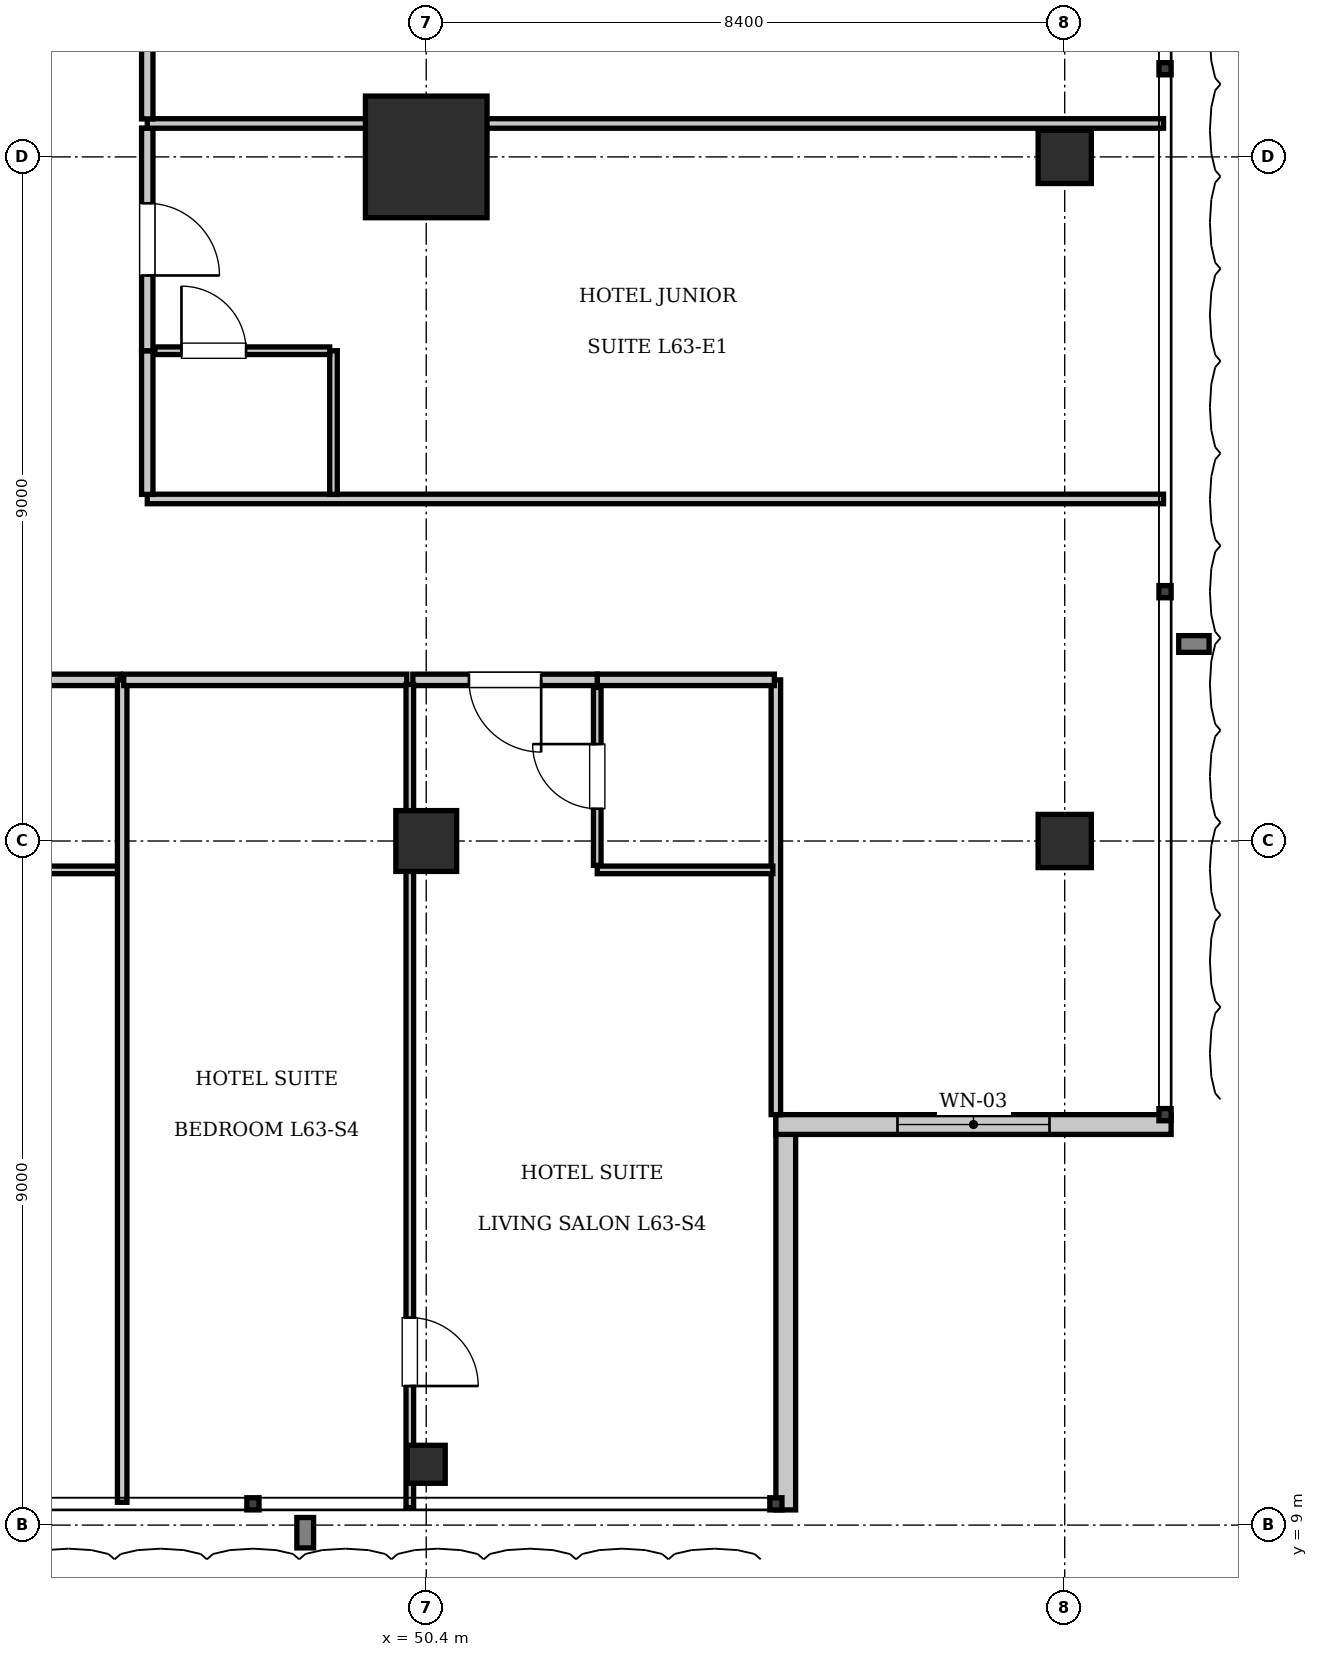
"""IFC4 building model, lengths in metres.
Left out: names, types, materials, properties, quantities, classifications, styles, units other than length and angle.
Written with IfcOpenShell. Run it as: python <this file> out.ifc"""

import sys

from ifc_helpers import new_model, si_unit, direction, frame, frame_2d, origin, origin_2d, place, context, subcontext, project, spatial, rectangle, i_section, extrude, element, fill, save


model = new_model("IFC4")
c1 = context("Model", 3, precision=1e-05, world=origin(), true_north=direction((0.0, 1.0)))
c2 = subcontext(c1, "Body", "Model", "MODEL_VIEW")
j1 = project(units=[si_unit("LENGTHUNIT", "METRE"), si_unit("PLANEANGLEUNIT", "RADIAN")], contexts=[c1])
p1 = place(None, origin())
s1 = spatial("IfcSite", under=j1, at=p1, CompositionType="ELEMENT")
p2 = place(p1, origin())
s2 = spatial("IfcBuilding", under=s1, at=p2, CompositionType="ELEMENT")
p3 = place(p2, frame((0.0, 0.0, 258.65)))
s3 = spatial("IfcBuildingStorey", under=s2, at=p3, CompositionType="ELEMENT", Elevation=258.65)
p4 = place(p3, frame((50.4, 27.0, 0.0), z_axis=(0.0, 0.0, 1.0), x_axis=(1.0, 0.0, 0.0)))
e1 = element("IfcColumn", 1, at=p4, inside=s3, PredefinedType="COLUMN", context=c2, shape_type="SweptSolid", body=[
    extrude(rectangle(XDim=1.6, YDim=1.6, at=origin_2d()), origin(), (0.0, 0.0, 1.0), 3.85),
])
p5 = place(p3, frame((50.4, 18.0, 0.0), z_axis=(0.0, 0.0, 1.0), x_axis=(1.0, 0.0, 0.0)))
e2 = element("IfcColumn", 2, at=p5, inside=s3, PredefinedType="COLUMN", context=c2, shape_type="SweptSolid", body=[
    extrude(rectangle(XDim=0.8, YDim=0.8, at=origin_2d()), origin(), (0.0, 0.0, 1.0), 3.85),
])
for number, where, z_axis, x_axis in (
    (3, (58.8, 18.0, 0.0), (0.0, 0.0, 1.0), (1.0, 0.0, 0.0)),
    (4, (58.8, 27.0, 0.0), (0.0, 0.0, 1.0), (1.0, 0.0, 0.0)),
):
    element("IfcColumn", number, at=place(p3, frame(where, z_axis=z_axis, x_axis=x_axis)), inside=s3, PredefinedType="COLUMN", context=c2, shape_type="SweptSolid", body=[
        extrude(rectangle(XDim=0.7, YDim=0.7, at=origin_2d()), origin(), (0.0, 0.0, 1.0), 3.85),
    ])
p6 = place(p3, frame((50.4, 9.8, 0.0), z_axis=(0.0, 0.0, 1.0), x_axis=(1.0, 0.0, 0.0)))
e5 = element("IfcColumn", 5, at=p6, inside=s3, PredefinedType="COLUMN", context=c2, shape_type="SweptSolid", body=[
    extrude(i_section(OverallWidth=0.5, OverallDepth=0.5, WebThickness=0.022, FlangeThickness=0.032, at=origin_2d()), origin(), (0.0, 0.0, 1.0), 3.85),
])
p7 = place(p3, frame((55.13, 14.4, 0.0), z_axis=(0.0, 0.0, 1.0), x_axis=(0.0, -1.0, 0.0)))
e6 = element("IfcWall", 6, at=p7, inside=s3, PredefinedType="SOLIDWALL", context=c2, shape_type="SweptSolid", body=[
    extrude(rectangle(XDim=5.2, YDim=0.26, at=frame_2d((2.6, 0.0))), origin(), (0.0, 0.0, 1.0), 3.61),
])
p8 = place(p3, frame((60.2, 14.27, 0.0), z_axis=(0.0, 0.0, 1.0), x_axis=(-1.0, 0.0, 0.0)))
e7 = element("IfcWall", 7, at=p8, inside=s3, PredefinedType="SOLIDWALL", context=c2, shape_type="SweptSolid", body=[
    extrude(rectangle(XDim=5.2, YDim=0.26, at=frame_2d((2.6, 0.0))), origin(), (0.0, 0.0, 1.0), 3.61),
])
p9 = place(p8, frame((1.6, 0.0, 0.9)))
e8 = element("IfcOpeningElement", 8, at=p9, cuts=e7, PredefinedType="OPENING", context=c2, shape_type="SweptSolid", body=[
    extrude(rectangle(XDim=2.0, YDim=2.2, at=frame_2d((1.0, 1.1))), frame((0.0, 0.14, 0.0), z_axis=(0.0, -1.0, 0.0), x_axis=(1.0, 0.0, 0.0)), (0.0, 0.0, 1.0), 0.28),
])
p10 = place(p3, frame((55.0, 14.4, 0.0), z_axis=(0.0, 0.0, 1.0), x_axis=(0.0, 1.0, 0.0)))
e9 = element("IfcWall", 9, at=p10, inside=s3, PredefinedType="PARTITIONING", context=c2, shape_type="SweptSolid", body=[
    extrude(rectangle(XDim=5.72, YDim=0.125, at=frame_2d((2.86, 0.0))), origin(), (0.0, 0.0, 1.0), 3.61),
])
p11 = place(p3, frame((44.05, 20.12, 0.0), z_axis=(0.0, 0.0, 1.0), x_axis=(1.0, 0.0, 0.0)))
e10 = element("IfcWall", 10, at=p11, inside=s3, PredefinedType="PARTITIONING", context=c2, shape_type="SweptSolid", body=[
    extrude(rectangle(XDim=2.33, YDim=0.15, at=frame_2d((1.165, 0.0))), origin(), (0.0, 0.0, 1.0), 3.61),
])
p12 = place(p3, frame((44.05, 17.62, 0.0), z_axis=(0.0, 0.0, 1.0), x_axis=(1.0, 0.0, 0.0)))
e11 = element("IfcWall", 11, at=p12, inside=s3, PredefinedType="PARTITIONING", context=c2, shape_type="SweptSolid", body=[
    extrude(rectangle(XDim=2.31, YDim=0.1, at=frame_2d((1.155, 0.0))), origin(), (0.0, 0.0, 1.0), 3.61),
])
p13 = place(p3, frame((46.4, 9.3, 0.0), z_axis=(0.0, 0.0, 1.0), x_axis=(0.0, 1.0, 0.0)))
e12 = element("IfcWall", 12, at=p13, inside=s3, PredefinedType="PARTITIONING", context=c2, shape_type="SweptSolid", body=[
    extrude(rectangle(XDim=10.82, YDim=0.125, at=frame_2d((5.41, 0.0))), origin(), (0.0, 0.0, 1.0), 3.61),
])
p14 = place(p3, frame((52.65, 20.12, 0.0), z_axis=(0.0, 0.0, 1.0), x_axis=(1.0, 0.0, 0.0)))
e13 = element("IfcWall", 13, at=p14, inside=s3, PredefinedType="PARTITIONING", context=c2, shape_type="SweptSolid", body=[
    extrude(rectangle(XDim=2.33, YDim=0.15, at=frame_2d((1.165, 0.0))), origin(), (0.0, 0.0, 1.0), 3.61),
])
p15 = place(p3, frame((52.65, 17.62, 0.0), z_axis=(0.0, 0.0, 1.0), x_axis=(1.0, 0.0, 0.0)))
e14 = element("IfcWall", 14, at=p15, inside=s3, PredefinedType="PARTITIONING", context=c2, shape_type="SweptSolid", body=[
    extrude(rectangle(XDim=2.31, YDim=0.1, at=frame_2d((1.155, 0.0))), origin(), (0.0, 0.0, 1.0), 3.61),
])
p16 = place(p3, frame((52.65, 17.68, 0.0), z_axis=(0.0, 0.0, 1.0), x_axis=(0.0, 1.0, 0.0)))
e15 = element("IfcWall", 15, at=p16, inside=s3, PredefinedType="PARTITIONING", context=c2, shape_type="SweptSolid", body=[
    extrude(rectangle(XDim=2.34, YDim=0.1, at=frame_2d((1.17, 0.0))), origin(), (0.0, 0.0, 1.0), 3.61),
])
p17 = place(p16, frame((0.745, 0.0, 0.0)))
e16 = element("IfcOpeningElement", 16, at=p17, cuts=e15, PredefinedType="OPENING", context=c2, shape_type="SweptSolid", body=[
    extrude(rectangle(XDim=0.85, YDim=2.1, at=frame_2d((0.425, 1.05))), frame((0.0, 0.06, 0.0), z_axis=(0.0, -1.0, 0.0), x_axis=(1.0, 0.0, 0.0)), (0.0, 0.0, 1.0), 0.12),
])
p18 = place(p3, frame((46.42, 20.12, 0.0), z_axis=(0.0, 0.0, 1.0), x_axis=(1.0, 0.0, 0.0)))
e17 = element("IfcWall", 17, at=p18, inside=s3, PredefinedType="PARTITIONING", context=c2, shape_type="SweptSolid", body=[
    extrude(rectangle(XDim=3.724, YDim=0.15, at=frame_2d((1.862, 0.0))), origin(), (0.0, 0.0, 1.0), 3.61),
])
p19 = place(p3, frame((50.224, 20.12, 0.0), z_axis=(0.0, 0.0, 1.0), x_axis=(1.0, 0.0, 0.0)))
e18 = element("IfcWall", 18, at=p19, inside=s3, PredefinedType="PARTITIONING", context=c2, shape_type="SweptSolid", body=[
    extrude(rectangle(XDim=2.426, YDim=0.15, at=frame_2d((1.213, 0.0))), origin(), (0.0, 0.0, 1.0), 3.61),
])
p20 = place(p19, frame((0.738, 0.0, 0.0)))
e19 = element("IfcOpeningElement", 19, at=p20, cuts=e18, PredefinedType="OPENING", context=c2, shape_type="SweptSolid", body=[
    extrude(rectangle(XDim=0.95, YDim=2.15, at=frame_2d((0.475, 1.075))), frame((0.0, 0.085, 0.0), z_axis=(0.0, -1.0, 0.0), x_axis=(1.0, 0.0, 0.0)), (0.0, 0.0, 1.0), 0.17),
])
p21 = place(p3, frame((50.184, 9.23, 0.0), z_axis=(0.0, 0.0, 1.0), x_axis=(0.0, 1.0, 0.0)))
e20 = element("IfcWall", 20, at=p21, inside=s3, PredefinedType="PARTITIONING", context=c2, shape_type="SweptSolid", body=[
    extrude(rectangle(XDim=10.83, YDim=0.1, at=frame_2d((5.415, 0.0))), origin(), (0.0, 0.0, 1.0), 3.61),
])
p22 = place(p21, frame((1.6, 0.0, 0.0)))
e21 = element("IfcOpeningElement", 21, at=p22, cuts=e20, PredefinedType="OPENING", context=c2, shape_type="SweptSolid", body=[
    extrude(rectangle(XDim=0.9, YDim=2.1, at=frame_2d((0.45, 1.05))), frame((0.0, 0.06, 0.0), z_axis=(0.0, -1.0, 0.0), x_axis=(1.0, 0.0, 0.0)), (0.0, 0.0, 1.0), 0.12),
])
p23 = place(p3, frame((46.73, 22.5, 0.0), z_axis=(0.0, 0.0, 1.0), x_axis=(1.0, 0.0, 0.0)))
e22 = element("IfcWall", 22, at=p23, inside=s3, PredefinedType="PARTITIONING", context=c2, shape_type="SweptSolid", body=[
    extrude(rectangle(XDim=13.37, YDim=0.125, at=frame_2d((6.685, 0.0))), origin(), (0.0, 0.0, 1.0), 3.61),
])
p24 = place(p3, frame((46.73, 22.56, 0.0), z_axis=(0.0, 0.0, 1.0), x_axis=(0.0, 1.0, 0.0)))
e23 = element("IfcWall", 23, at=p24, inside=s3, PredefinedType="PARTITIONING", context=c2, shape_type="SweptSolid", body=[
    extrude(rectangle(XDim=1.89, YDim=0.15, at=frame_2d((0.945, 0.0))), origin(), (0.0, 0.0, 1.0), 3.61),
])
p25 = place(p3, frame((46.73, 24.45, 0.0), z_axis=(0.0, 0.0, 1.0), x_axis=(0.0, 1.0, 0.0)))
e24 = element("IfcWall", 24, at=p25, inside=s3, PredefinedType="PARTITIONING", context=c2, shape_type="SweptSolid", body=[
    extrude(rectangle(XDim=2.93, YDim=0.15, at=frame_2d((1.465, 0.0))), origin(), (0.0, 0.0, 1.0), 3.61),
])
p26 = place(p25, frame((0.99, 0.0, 0.0)))
e25 = element("IfcOpeningElement", 25, at=p26, cuts=e24, PredefinedType="OPENING", context=c2, shape_type="SweptSolid", body=[
    extrude(rectangle(XDim=0.95, YDim=2.15, at=frame_2d((0.475, 1.075))), frame((0.0, 0.085, 0.0), z_axis=(0.0, -1.0, 0.0), x_axis=(1.0, 0.0, 0.0)), (0.0, 0.0, 1.0), 0.17),
])
p27 = place(p3, frame((49.18, 22.56, 0.0), z_axis=(0.0, 0.0, 1.0), x_axis=(0.0, 1.0, 0.0)))
e26 = element("IfcWall", 26, at=p27, inside=s3, PredefinedType="PARTITIONING", context=c2, shape_type="SweptSolid", body=[
    extrude(rectangle(XDim=1.89, YDim=0.1, at=frame_2d((0.945, 0.0))), origin(), (0.0, 0.0, 1.0), 3.61),
])
p28 = place(p3, frame((46.83, 24.45, 0.0), z_axis=(0.0, 0.0, 1.0), x_axis=(1.0, 0.0, 0.0)))
e27 = element("IfcWall", 27, at=p28, inside=s3, PredefinedType="PARTITIONING", context=c2, shape_type="SweptSolid", body=[
    extrude(rectangle(XDim=2.3, YDim=0.1, at=frame_2d((1.15, 0.0))), origin(), (0.0, 0.0, 1.0), 3.61),
])
p29 = place(p28, frame((0.35, 0.0, 0.0)))
e28 = element("IfcOpeningElement", 28, at=p29, cuts=e27, PredefinedType="OPENING", context=c2, shape_type="SweptSolid", body=[
    extrude(rectangle(XDim=0.85, YDim=2.1, at=frame_2d((0.425, 1.05))), frame((0.0, 0.06, 0.0), z_axis=(0.0, -1.0, 0.0), x_axis=(1.0, 0.0, 0.0)), (0.0, 0.0, 1.0), 0.12),
])
p30 = place(p3, frame((46.73, 27.44, 0.0), z_axis=(0.0, 0.0, 1.0), x_axis=(1.0, 0.0, 0.0)))
e29 = element("IfcWall", 29, at=p30, inside=s3, PredefinedType="PARTITIONING", context=c2, shape_type="SweptSolid", body=[
    extrude(rectangle(XDim=13.37, YDim=0.125, at=frame_2d((6.685, 0.0))), origin(), (0.0, 0.0, 1.0), 3.61),
])
p31 = place(p3, frame((46.73, 27.5, 0.0), z_axis=(0.0, 0.0, 1.0), x_axis=(0.0, 1.0, 0.0)))
e30 = element("IfcWall", 30, at=p31, inside=s3, PredefinedType="PARTITIONING", context=c2, shape_type="SweptSolid", body=[
    extrude(rectangle(XDim=2.93, YDim=0.15, at=frame_2d((1.465, 0.0))), origin(), (0.0, 0.0, 1.0), 3.61),
])
p32 = place(p31, frame((0.99, 0.0, 0.0)))
e31 = element("IfcOpeningElement", 31, at=p32, cuts=e30, PredefinedType="OPENING", context=c2, shape_type="SweptSolid", body=[
    extrude(rectangle(XDim=0.95, YDim=2.15, at=frame_2d((0.475, 1.075))), frame((0.0, 0.085, 0.0), z_axis=(0.0, -1.0, 0.0), x_axis=(1.0, 0.0, 0.0)), (0.0, 0.0, 1.0), 0.17),
])
p33 = place(p9, origin())
e32 = element("IfcWindow", 32, at=p33, inside=s3, PartitioningType="SINGLE_PANEL", PredefinedType="WINDOW", context=c2, shape_type="SweptSolid", body=[
    extrude(rectangle(XDim=2.0, YDim=2.2, at=frame_2d((1.0, 1.1))), frame((0.0, 0.03, 0.0), z_axis=(0.0, -1.0, 0.0), x_axis=(1.0, 0.0, 0.0)), (0.0, 0.0, 1.0), 0.06),
])
fill(e8, e32)
p34 = place(p17, origin())
e33 = element("IfcDoor", 33, at=p34, inside=s3, OperationType="SINGLE_SWING_RIGHT", PredefinedType="DOOR", context=c2, shape_type="SweptSolid", body=[
    extrude(rectangle(XDim=0.85, YDim=2.1, at=frame_2d((0.425, 1.05))), frame((0.0, 0.025, 0.0), z_axis=(0.0, -1.0, 0.0), x_axis=(1.0, 0.0, 0.0)), (0.0, 0.0, 1.0), 0.05),
])
fill(e16, e33)
p35 = place(p20, frame((0.95, 0.0, 0.0), z_axis=(0.0, 0.0, 1.0), x_axis=(-1.0, 0.0, 0.0)))
e34 = element("IfcDoor", 34, at=p35, inside=s3, OperationType="SINGLE_SWING_LEFT", PredefinedType="DOOR", context=c2, shape_type="SweptSolid", body=[
    extrude(rectangle(XDim=0.95, YDim=2.15, at=frame_2d((0.475, 1.075))), frame((0.0, 0.025, 0.0), z_axis=(0.0, -1.0, 0.0), x_axis=(1.0, 0.0, 0.0)), (0.0, 0.0, 1.0), 0.05),
])
fill(e19, e34)
p36 = place(p22, frame((0.9, 0.0, 0.0), z_axis=(0.0, 0.0, 1.0), x_axis=(-1.0, 0.0, 0.0)))
e35 = element("IfcDoor", 35, at=p36, inside=s3, OperationType="SINGLE_SWING_RIGHT", PredefinedType="DOOR", context=c2, shape_type="SweptSolid", body=[
    extrude(rectangle(XDim=0.9, YDim=2.1, at=frame_2d((0.45, 1.05))), frame((0.0, 0.025, 0.0), z_axis=(0.0, -1.0, 0.0), x_axis=(1.0, 0.0, 0.0)), (0.0, 0.0, 1.0), 0.05),
])
fill(e21, e35)
p37 = place(p29, origin())
e36 = element("IfcDoor", 36, at=p37, inside=s3, OperationType="SINGLE_SWING_LEFT", PredefinedType="DOOR", context=c2, shape_type="SweptSolid", body=[
    extrude(rectangle(XDim=0.85, YDim=2.1, at=frame_2d((0.425, 1.05))), frame((0.0, 0.025, 0.0), z_axis=(0.0, -1.0, 0.0), x_axis=(1.0, 0.0, 0.0)), (0.0, 0.0, 1.0), 0.05),
])
fill(e28, e36)
p38 = place(p26, frame((0.95, 0.0, 0.0), z_axis=(0.0, 0.0, 1.0), x_axis=(-1.0, 0.0, 0.0)))
e37 = element("IfcDoor", 37, at=p38, inside=s3, OperationType="SINGLE_SWING_RIGHT", PredefinedType="DOOR", context=c2, shape_type="SweptSolid", body=[
    extrude(rectangle(XDim=0.95, YDim=2.15, at=frame_2d((0.475, 1.075))), frame((0.0, 0.025, 0.0), z_axis=(0.0, -1.0, 0.0), x_axis=(1.0, 0.0, 0.0)), (0.0, 0.0, 1.0), 0.05),
])
fill(e25, e37)
save(model, sys.argv[1])
